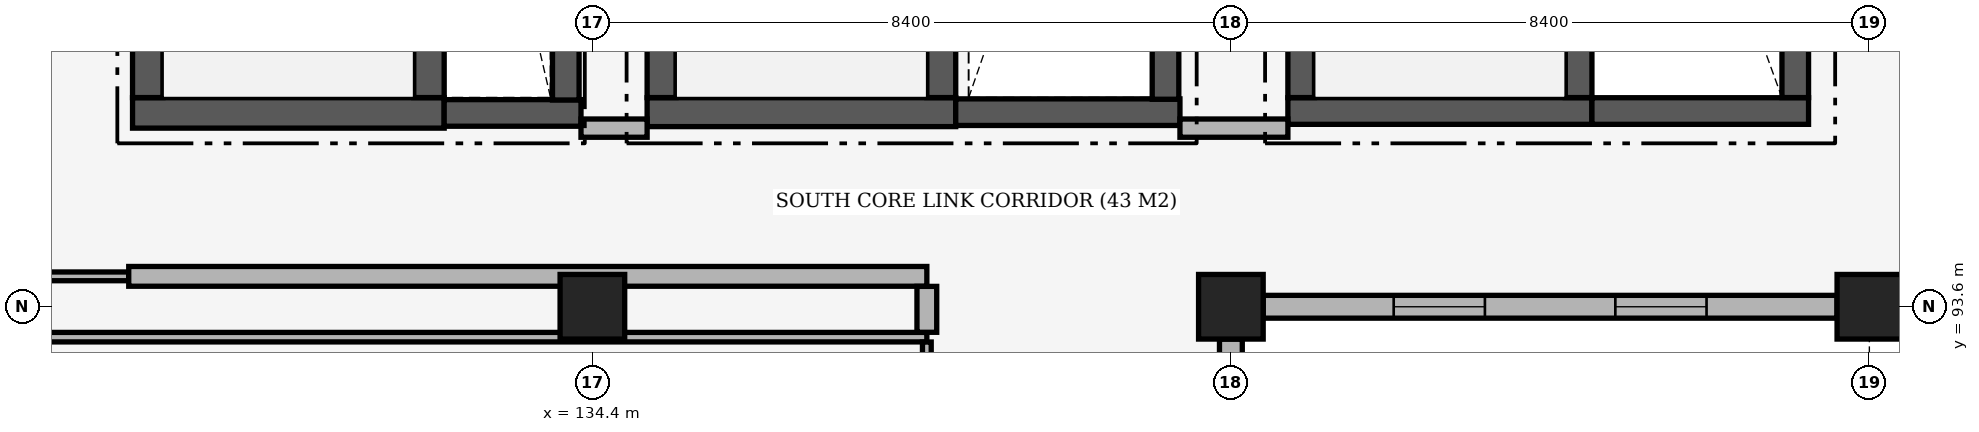
"""IFC4 building model, lengths in metres.
Left out: names, types, materials, properties, quantities, classifications, styles, units other than length and angle.
Written with IfcOpenShell. Run it as: python <this file> out.ifc"""

import sys

from ifc_helpers import new_model, si_unit, direction, frame, frame_2d, origin, origin_2d, place, context, subcontext, project, spatial, rectangle, extrude, element, fill, save


model = new_model("IFC4")
c1 = context("Model", 3, precision=1e-05, world=origin(), true_north=direction((0.0, 1.0)))
c2 = subcontext(c1, "Body", "Model", "MODEL_VIEW")
j1 = project(units=[si_unit("LENGTHUNIT", "METRE"), si_unit("PLANEANGLEUNIT", "RADIAN")], contexts=[c1])
p1 = place(None, origin())
s1 = spatial("IfcSite", under=j1, at=p1, CompositionType="ELEMENT")
p2 = place(p1, origin())
s2 = spatial("IfcBuilding", under=s1, at=p2, CompositionType="ELEMENT")
p3 = place(p2, origin())
s3 = spatial("IfcBuildingStorey", under=s2, at=p3, CompositionType="ELEMENT", Elevation=0.0)
for number, where, z_axis, x_axis in (
    (1, (134.4, 93.6, 0.0), (0.0, 0.0, 1.0), (1.0, 0.0, 0.0)),
    (2, (142.8, 93.6, 0.0), (0.0, 0.0, 1.0), (1.0, 0.0, 0.0)),
    (3, (151.2, 93.6, 0.0), (0.0, 0.0, 1.0), (1.0, 0.0, 0.0)),
):
    element("IfcColumn", number, at=place(p3, frame(where, z_axis=z_axis, x_axis=x_axis)), inside=s3, PredefinedType="COLUMN", context=c2, shape_type="SweptSolid", body=[
        extrude(rectangle(XDim=0.85, YDim=0.85, at=origin_2d()), origin(), (0.0, 0.0, 1.0), 5.1),
    ])
p4 = place(p3, frame((150.775, 93.6, 0.0), z_axis=(0.0, 0.0, 1.0), x_axis=(-1.0, 0.0, 0.0)))
e4 = element("IfcWall", 4, at=p4, inside=s3, PredefinedType="SOLIDWALL", context=c2, shape_type="SweptSolid", body=[
    extrude(rectangle(XDim=7.55, YDim=0.3, at=frame_2d((3.775, 0.0))), origin(), (0.0, 0.0, 1.0), 4.12),
])
p5 = place(p4, frame((1.717, 0.0, 0.85)))
e5 = element("IfcOpeningElement", 5, at=p5, cuts=e4, PredefinedType="OPENING", context=c2, shape_type="SweptSolid", body=[
    extrude(rectangle(XDim=1.2, YDim=2.4, at=frame_2d((0.6, 1.2))), frame((0.0, 0.165, 0.0), z_axis=(0.0, -1.0, 0.0), x_axis=(1.0, 0.0, 0.0)), (0.0, 0.0, 1.0), 0.33),
])
p6 = place(p4, frame((4.633, 0.0, 0.85)))
e6 = element("IfcOpeningElement", 6, at=p6, cuts=e4, PredefinedType="OPENING", context=c2, shape_type="SweptSolid", body=[
    extrude(rectangle(XDim=1.2, YDim=2.4, at=frame_2d((0.6, 1.2))), frame((0.0, 0.165, 0.0), z_axis=(0.0, -1.0, 0.0), x_axis=(1.0, 0.0, 0.0)), (0.0, 0.0, 1.0), 0.33),
])
p7 = place(p3, frame((142.8, 93.175, 0.0), z_axis=(0.0, 0.0, 1.0), x_axis=(0.0, -1.0, 0.0)))
e7 = element("IfcWall", 7, at=p7, inside=s3, PredefinedType="SOLIDWALL", context=c2, shape_type="SweptSolid", body=[
    extrude(rectangle(XDim=7.55, YDim=0.3, at=frame_2d((3.775, 0.0))), origin(), (0.0, 0.0, 1.0), 4.02),
])
p8 = place(p7, frame((1.717, 0.0, 0.85)))
e8 = element("IfcOpeningElement", 8, at=p8, cuts=e7, PredefinedType="OPENING", context=c2, shape_type="SweptSolid", body=[
    extrude(rectangle(XDim=1.2, YDim=2.4, at=frame_2d((0.6, 1.2))), frame((0.0, 0.165, 0.0), z_axis=(0.0, -1.0, 0.0), x_axis=(1.0, 0.0, 0.0)), (0.0, 0.0, 1.0), 0.33),
])
p9 = place(p7, frame((4.633, 0.0, 0.85)))
e9 = element("IfcOpeningElement", 9, at=p9, cuts=e7, PredefinedType="OPENING", context=c2, shape_type="SweptSolid", body=[
    extrude(rectangle(XDim=1.2, YDim=2.4, at=frame_2d((0.6, 1.2))), frame((0.0, 0.165, 0.0), z_axis=(0.0, -1.0, 0.0), x_axis=(1.0, 0.0, 0.0)), (0.0, 0.0, 1.0), 0.33),
])
p10 = place(p3, frame((128.35, 96.15, 0.0), z_axis=(0.0, 0.0, 1.0), x_axis=(1.0, 0.0, 0.0)))
e10 = element("IfcWall", 10, at=p10, inside=s3, PredefinedType="SHEAR", context=c2, shape_type="SweptSolid", body=[
    extrude(rectangle(XDim=4.1, YDim=0.4, at=frame_2d((2.05, 0.0))), origin(), (0.0, 0.0, 1.0), 4.82),
])
for number, where, z_axis, x_axis in (
    (11, (128.55, 96.352, 0.0), (0.0, 0.0, 1.0), (0.0, 1.0, 0.0)),
    (12, (132.25, 96.352, 0.0), (0.0, 0.0, 1.0), (0.0, 1.0, 0.0)),
):
    element("IfcWall", number, at=place(p3, frame(where, z_axis=z_axis, x_axis=x_axis)), inside=s3, PredefinedType="SHEAR", context=c2, shape_type="SweptSolid", body=[
        extrude(rectangle(XDim=6.896, YDim=0.4, at=frame_2d((3.448, 0.0))), origin(), (0.0, 0.0, 1.0), 4.82),
    ])
p11 = place(p3, frame((132.45, 96.15, 0.0), z_axis=(0.0, 0.0, 1.0), x_axis=(1.0, 0.0, 0.0)))
e13 = element("IfcWall", 13, at=p11, inside=s3, PredefinedType="SHEAR", context=c2, shape_type="SweptSolid", body=[
    extrude(rectangle(XDim=1.8, YDim=0.35, at=frame_2d((0.9, 0.0))), origin(), (0.0, 0.0, 1.0), 4.82),
])
p12 = place(p3, frame((134.05, 96.32, 0.0), z_axis=(0.0, 0.0, 1.0), x_axis=(0.0, 1.0, 0.0)))
e14 = element("IfcWall", 14, at=p12, inside=s3, PredefinedType="SHEAR", context=c2, shape_type="SweptSolid", body=[
    extrude(rectangle(XDim=7.187, YDim=0.35, at=frame_2d((3.594, 0.0))), origin(), (0.0, 0.0, 1.0), 4.82),
])
p13 = place(p3, frame((135.12, 96.16, 0.0), z_axis=(0.0, 0.0, 1.0), x_axis=(1.0, 0.0, 0.0)))
e15 = element("IfcWall", 15, at=p13, inside=s3, PredefinedType="SHEAR", context=c2, shape_type="SweptSolid", body=[
    extrude(rectangle(XDim=4.06, YDim=0.38, at=frame_2d((2.03, 0.0))), origin(), (0.0, 0.0, 1.0), 4.82),
])
for number, where, z_axis, x_axis in (
    (16, (135.31, 96.352, 0.0), (0.0, 0.0, 1.0), (0.0, 1.0, 0.0)),
    (17, (138.99, 96.352, 0.0), (0.0, 0.0, 1.0), (0.0, 1.0, 0.0)),
):
    element("IfcWall", number, at=place(p3, frame(where, z_axis=z_axis, x_axis=x_axis)), inside=s3, PredefinedType="SHEAR", context=c2, shape_type="SweptSolid", body=[
        extrude(rectangle(XDim=6.896, YDim=0.38, at=frame_2d((3.448, 0.0))), origin(), (0.0, 0.0, 1.0), 4.82),
    ])
p14 = place(p3, frame((139.18, 96.16, 0.0), z_axis=(0.0, 0.0, 1.0), x_axis=(1.0, 0.0, 0.0)))
e18 = element("IfcWall", 18, at=p14, inside=s3, PredefinedType="SHEAR", context=c2, shape_type="SweptSolid", body=[
    extrude(rectangle(XDim=2.95, YDim=0.35, at=frame_2d((1.475, 0.0))), origin(), (0.0, 0.0, 1.0), 4.82),
])
p15 = place(p3, frame((141.94, 96.33, 0.0), z_axis=(0.0, 0.0, 1.0), x_axis=(0.0, 1.0, 0.0)))
e19 = element("IfcWall", 19, at=p15, inside=s3, PredefinedType="SHEAR", context=c2, shape_type="SweptSolid", body=[
    extrude(rectangle(XDim=7.177, YDim=0.35, at=frame_2d((3.588, 0.0))), origin(), (0.0, 0.0, 1.0), 4.82),
])
p16 = place(p3, frame((143.55, 96.175, 0.0), z_axis=(0.0, 0.0, 1.0), x_axis=(1.0, 0.0, 0.0)))
e20 = element("IfcWall", 20, at=p16, inside=s3, PredefinedType="SHEAR", context=c2, shape_type="SweptSolid", body=[
    extrude(rectangle(XDim=4.0, YDim=0.35, at=frame_2d((2.0, 0.0))), origin(), (0.0, 0.0, 1.0), 4.82),
])
for number, where, z_axis, x_axis in (
    (21, (143.725, 96.352, 0.0), (0.0, 0.0, 1.0), (0.0, 1.0, 0.0)),
    (22, (147.375, 96.352, 0.0), (0.0, 0.0, 1.0), (0.0, 1.0, 0.0)),
):
    element("IfcWall", number, at=place(p3, frame(where, z_axis=z_axis, x_axis=x_axis)), inside=s3, PredefinedType="SHEAR", context=c2, shape_type="SweptSolid", body=[
        extrude(rectangle(XDim=6.896, YDim=0.35, at=frame_2d((3.448, 0.0))), origin(), (0.0, 0.0, 1.0), 4.82),
    ])
p17 = place(p3, frame((147.55, 96.175, 0.0), z_axis=(0.0, 0.0, 1.0), x_axis=(1.0, 0.0, 0.0)))
e23 = element("IfcWall", 23, at=p17, inside=s3, PredefinedType="SHEAR", context=c2, shape_type="SweptSolid", body=[
    extrude(rectangle(XDim=2.85, YDim=0.35, at=frame_2d((1.425, 0.0))), origin(), (0.0, 0.0, 1.0), 4.82),
])
p18 = place(p3, frame((150.225, 96.352, 0.0), z_axis=(0.0, 0.0, 1.0), x_axis=(0.0, 1.0, 0.0)))
e24 = element("IfcWall", 24, at=p18, inside=s3, PredefinedType="SHEAR", context=c2, shape_type="SweptSolid", body=[
    extrude(rectangle(XDim=7.155, YDim=0.35, at=frame_2d((3.578, 0.0))), origin(), (0.0, 0.0, 1.0), 4.82),
])
p19 = place(p3, frame((126.144, 93.2, 0.0), z_axis=(0.0, 0.0, 1.0), x_axis=(1.0, 0.0, 0.0)))
e25 = element("IfcWall", 25, at=p19, inside=s3, PredefinedType="PARTITIONING", context=c2, shape_type="SweptSolid", body=[
    extrude(rectangle(XDim=12.656, YDim=0.125, at=frame_2d((6.328, 0.0))), origin(), (0.0, 0.0, 1.0), 4.02),
])
p20 = place(p3, frame((126.144, 94.0, 0.0), z_axis=(0.0, 0.0, 1.0), x_axis=(1.0, 0.0, 0.0)))
e26 = element("IfcWall", 26, at=p20, inside=s3, PredefinedType="PARTITIONING", context=c2, shape_type="SweptSolid", body=[
    extrude(rectangle(XDim=2.156, YDim=0.115, at=frame_2d((1.078, 0.0))), origin(), (0.0, 0.0, 1.0), 4.17),
])
p21 = place(p3, frame((128.3, 94.0, 0.0), z_axis=(0.0, 0.0, 1.0), x_axis=(1.0, 0.0, 0.0)))
e27 = element("IfcWall", 27, at=p21, inside=s3, PredefinedType="PARTITIONING", context=c2, shape_type="SweptSolid", body=[
    extrude(rectangle(XDim=10.5, YDim=0.26, at=frame_2d((5.25, 0.0))), origin(), (0.0, 0.0, 1.0), 4.17),
])
p22 = place(p3, frame((134.25, 95.95, 0.0), z_axis=(0.0, 0.0, 1.0), x_axis=(1.0, 0.0, 0.0)))
e28 = element("IfcWall", 28, at=p22, inside=s3, PredefinedType="PARTITIONING", context=c2, shape_type="SweptSolid", body=[
    extrude(rectangle(XDim=0.87, YDim=0.24, at=frame_2d((0.435, 0.0))), origin(), (0.0, 0.0, 1.0), 4.17),
])
p23 = place(p3, frame((142.13, 95.95, 0.0), z_axis=(0.0, 0.0, 1.0), x_axis=(1.0, 0.0, 0.0)))
e29 = element("IfcWall", 29, at=p23, inside=s3, PredefinedType="PARTITIONING", context=c2, shape_type="SweptSolid", body=[
    extrude(rectangle(XDim=1.42, YDim=0.24, at=frame_2d((0.71, 0.0))), origin(), (0.0, 0.0, 1.0), 4.17),
])
p24 = place(p3, frame((138.8, 74.965, 0.0), z_axis=(0.0, 0.0, 1.0), x_axis=(0.0, 1.0, 0.0)))
e30 = element("IfcWall", 30, at=p24, inside=s3, PredefinedType="PARTITIONING", context=c2, shape_type="SweptSolid", body=[
    extrude(rectangle(XDim=18.171, YDim=0.115, at=frame_2d((9.085, 0.0))), origin(), (0.0, 0.0, 1.0), 4.07),
])
p25 = place(p24, frame((8.635, 0.0, 0.0)))
e31 = element("IfcOpeningElement", 31, at=p25, cuts=e30, PredefinedType="OPENING", context=c2, shape_type="SweptSolid", body=[
    extrude(rectangle(XDim=0.9, YDim=2.2, at=frame_2d((0.45, 1.1))), frame((0.0, 0.072, 0.0), z_axis=(0.0, -1.0, 0.0), x_axis=(1.0, 0.0, 0.0)), (0.0, 0.0, 1.0), 0.145),
])
p26 = place(p3, frame((138.8, 93.264, 0.0), z_axis=(0.0, 0.0, 1.0), x_axis=(0.0, 1.0, 0.0)))
e32 = element("IfcWall", 32, at=p26, inside=s3, PredefinedType="PARTITIONING", context=c2, shape_type="SweptSolid", body=[
    extrude(rectangle(XDim=0.604, YDim=0.26, at=frame_2d((0.302, 0.0))), origin(), (0.0, 0.0, 1.0), 4.12),
])
p27 = place(p5, origin())
e33 = element("IfcWindow", 33, at=p27, inside=s3, PartitioningType="SINGLE_PANEL", PredefinedType="WINDOW", context=c2, shape_type="SweptSolid", body=[
    extrude(rectangle(XDim=1.2, YDim=2.4, at=frame_2d((0.6, 1.2))), frame((0.0, 0.03, 0.0), z_axis=(0.0, -1.0, 0.0), x_axis=(1.0, 0.0, 0.0)), (0.0, 0.0, 1.0), 0.06),
])
fill(e5, e33)
p28 = place(p6, origin())
e34 = element("IfcWindow", 34, at=p28, inside=s3, PartitioningType="SINGLE_PANEL", PredefinedType="WINDOW", context=c2, shape_type="SweptSolid", body=[
    extrude(rectangle(XDim=1.2, YDim=2.4, at=frame_2d((0.6, 1.2))), frame((0.0, 0.03, 0.0), z_axis=(0.0, -1.0, 0.0), x_axis=(1.0, 0.0, 0.0)), (0.0, 0.0, 1.0), 0.06),
])
fill(e6, e34)
save(model, sys.argv[1])
